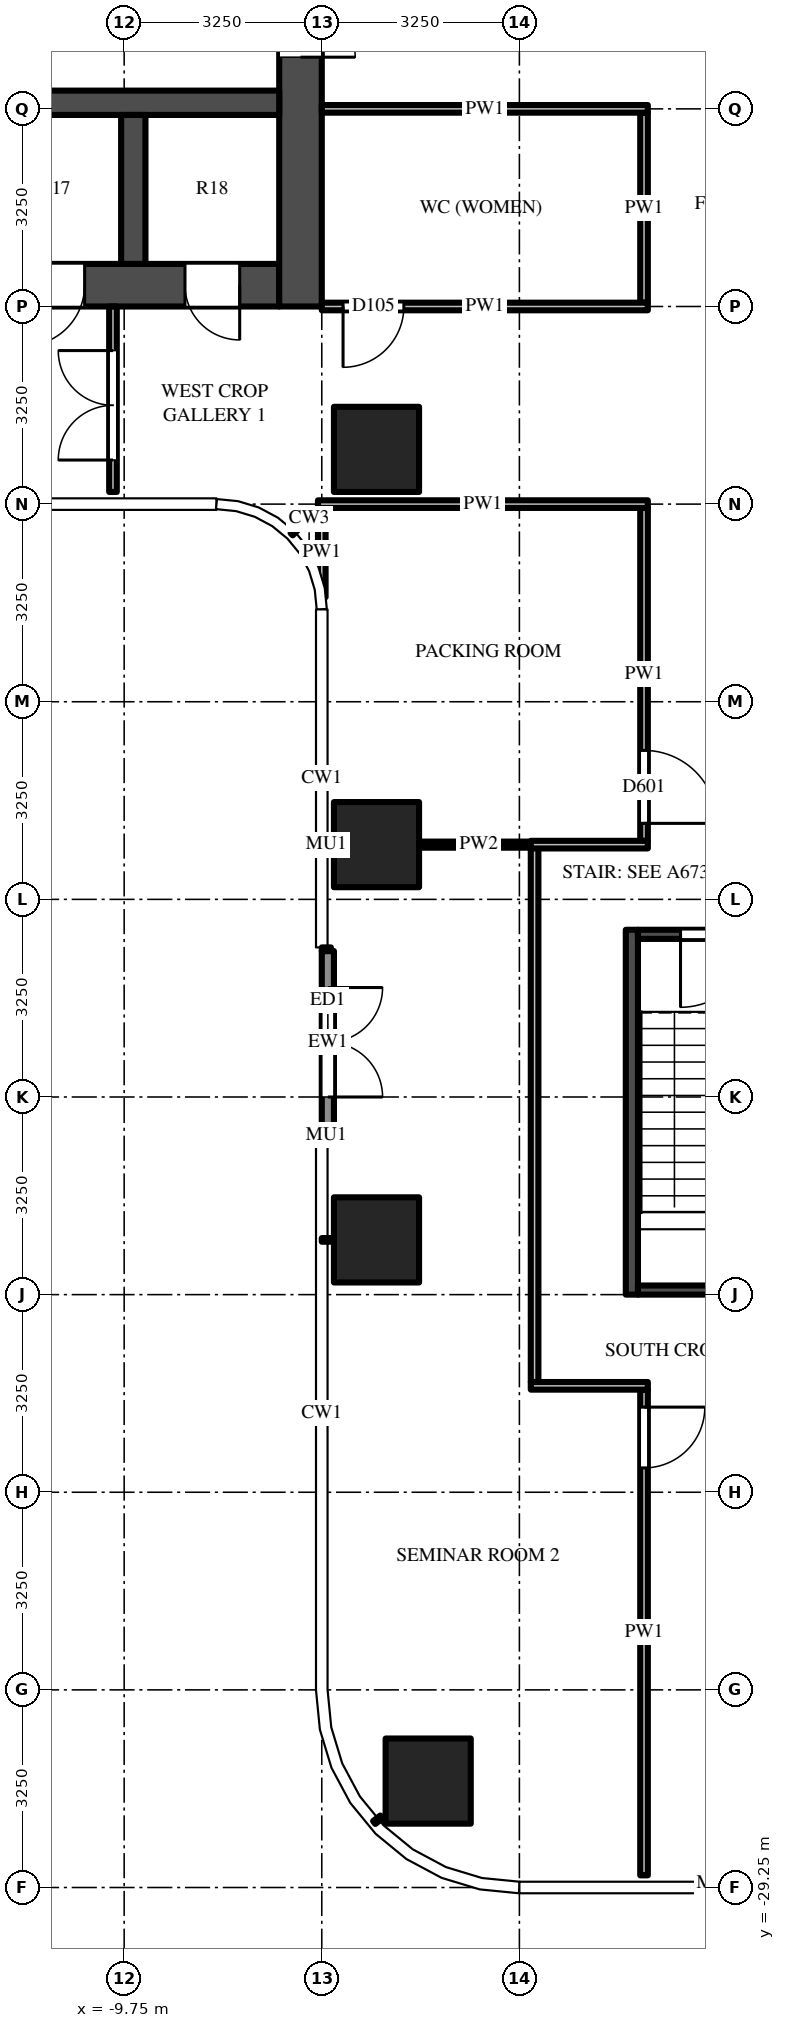
"""IFC4 building model, lengths in metres.
Left out: names, types, materials, properties, quantities, classifications, styles, units other than length and angle.
Written with IfcOpenShell. Run it as: python <this file> out.ifc"""

import sys

from ifc_helpers import new_model, si_unit, direction, frame, frame_2d, origin, origin_2d, place, context, subcontext, project, spatial, rectangle, extrude, source, transform, mapped, element, fill, save


model = new_model("IFC4")
c1 = context("Model", 3, precision=1e-05, world=origin(), true_north=direction((0.0, 1.0)))
c2 = subcontext(c1, "Body", "Model", "MODEL_VIEW")
j1 = project(units=[si_unit("LENGTHUNIT", "METRE"), si_unit("PLANEANGLEUNIT", "RADIAN")], contexts=[c1])
p1 = place(None, origin())
s1 = spatial("IfcSite", under=j1, at=p1, CompositionType="ELEMENT")
p2 = place(p1, origin())
s2 = spatial("IfcBuilding", under=s1, at=p2, CompositionType="ELEMENT")
p3 = place(p2, frame((0.0, 0.0, 65.5)))
s3 = spatial("IfcBuildingStorey", under=s2, at=p3, CompositionType="ELEMENT", Elevation=65.5)
m1 = source(origin(), c2, "Body", "SweptSolid", [
    extrude(rectangle(XDim=1.4, YDim=1.4, at=origin_2d()), origin(), (0.0, 0.0, 1.0), 4.5),
])
for number, where, z_axis, x_axis in (
    (1, (-5.6, -5.6, 0.0), (0.0, 0.0, 1.0), (1.0, 0.0, 0.0)),
    (2, (-5.6, -12.1, 0.0), (0.0, 0.0, 1.0), (1.0, 0.0, 0.0)),
    (3, (-5.6, -18.6, 0.0), (0.0, 0.0, 1.0), (1.0, 0.0, 0.0)),
    (4, (-4.75, -27.5, 0.0), (0.0, 0.0, 1.0), (1.0, 0.0, 0.0)),
):
    element("IfcColumn", number, at=place(p3, frame(where, z_axis=z_axis, x_axis=x_axis)), inside=s3, PredefinedType="COLUMN", context=c2, shape_type="MappedRepresentation", body=[
        mapped(m1, transform((0.0, 0.0, 0.0))),
    ])
m2 = source(origin(), c2, "Body", "SweptSolid", [
    extrude(rectangle(XDim=14.85, YDim=0.7, at=frame_2d((7.425, 0.0))), origin(), (0.0, 0.0, 1.0), 4.25),
])
p4 = place(p3, frame((-7.2, -2.9, 0.0), z_axis=(0.0, 0.0, 1.0), x_axis=(-1.0, 0.0, 0.0)))
e5 = element("IfcWall", 5, at=p4, inside=s3, PredefinedType="SHEAR", context=c2, shape_type="MappedRepresentation", body=[
    mapped(m2, transform((0.0, 0.0, 0.0))),
])
m3 = source(origin(), c2, "Body", "SweptSolid", [
    extrude(rectangle(XDim=1.3, YDim=2.1, at=frame_2d((0.65, 1.05))), frame((0.0, 0.36, 0.0), z_axis=(0.0, -1.0, 0.0), x_axis=(1.0, 0.0, 0.0)), (0.0, 0.0, 1.0), 0.72),
])
p5 = place(p4, frame((12.2, 0.0, 0.0)))
e6 = element("IfcOpeningElement", 6, at=p5, cuts=e5, PredefinedType="OPENING", context=c2, shape_type="MappedRepresentation", body=[
    mapped(m3, transform((0.0, 0.0, 0.0))),
])
m4 = source(origin(), c2, "Body", "SweptSolid", [
    extrude(rectangle(XDim=1.2, YDim=2.1, at=frame_2d((0.6, 1.05))), frame((0.0, 0.36, 0.0), z_axis=(0.0, -1.0, 0.0), x_axis=(1.0, 0.0, 0.0)), (0.0, 0.0, 1.0), 0.72),
])
p6 = place(p4, frame((9.85, 0.0, 0.0)))
e7 = element("IfcOpeningElement", 7, at=p6, cuts=e5, PredefinedType="OPENING", context=c2, shape_type="MappedRepresentation", body=[
    mapped(m4, transform((0.0, 0.0, 0.0))),
])
m5 = source(origin(), c2, "Body", "SweptSolid", [
    extrude(rectangle(XDim=1.0, YDim=2.1, at=frame_2d((0.5, 1.05))), frame((0.0, 0.36, 0.0), z_axis=(0.0, -1.0, 0.0), x_axis=(1.0, 0.0, 0.0)), (0.0, 0.0, 1.0), 0.72),
])
p7 = place(p4, frame((7.9, 0.0, 0.0)))
e8 = element("IfcOpeningElement", 8, at=p7, cuts=e5, PredefinedType="OPENING", context=c2, shape_type="MappedRepresentation", body=[
    mapped(m5, transform((0.0, 0.0, 0.0))),
])
m6 = source(origin(), c2, "Body", "SweptSolid", [
    extrude(rectangle(XDim=0.9, YDim=2.1, at=frame_2d((0.45, 1.05))), frame((0.0, 0.36, 0.0), z_axis=(0.0, -1.0, 0.0), x_axis=(1.0, 0.0, 0.0)), (0.0, 0.0, 1.0), 0.72),
])
p8 = place(p4, frame((0.65, 0.0, 0.0)))
e9 = element("IfcOpeningElement", 9, at=p8, cuts=e5, PredefinedType="OPENING", context=c2, shape_type="MappedRepresentation", body=[
    mapped(m6, transform((0.0, 0.0, 0.0))),
])
p9 = place(p4, frame((3.2, 0.0, 0.0)))
e10 = element("IfcOpeningElement", 10, at=p9, cuts=e5, PredefinedType="OPENING", context=c2, shape_type="MappedRepresentation", body=[
    mapped(m5, transform((0.0, 0.0, 0.0))),
])
p10 = place(p4, frame((5.85, 0.0, 0.0)))
e11 = element("IfcOpeningElement", 11, at=p10, cuts=e5, PredefinedType="OPENING", context=c2, shape_type="MappedRepresentation", body=[
    mapped(m6, transform((0.0, 0.0, 0.0))),
])
m7 = source(origin(), c2, "Body", "SweptSolid", [
    extrude(rectangle(XDim=9.05, YDim=0.7, at=frame_2d((4.525, 0.0))), origin(), (0.0, 0.0, 1.0), 4.25),
])
p11 = place(p3, frame((-6.85, 5.8, 0.0), z_axis=(0.0, 0.0, 1.0), x_axis=(0.0, -1.0, 0.0)))
e12 = element("IfcWall", 12, at=p11, inside=s3, PredefinedType="SHEAR", context=c2, shape_type="MappedRepresentation", body=[
    mapped(m7, transform((0.0, 0.0, 0.0))),
])
m8 = source(origin(), c2, "Body", "SweptSolid", [
    extrude(rectangle(XDim=1.8, YDim=2.1, at=frame_2d((0.9, 1.05))), frame((0.0, 0.36, 0.0), z_axis=(0.0, -1.0, 0.0), x_axis=(1.0, 0.0, 0.0)), (0.0, 0.0, 1.0), 0.72),
])
p12 = place(p11, frame((3.15, 0.0, 0.0)))
e13 = element("IfcOpeningElement", 13, at=p12, cuts=e12, PredefinedType="OPENING", context=c2, shape_type="MappedRepresentation", body=[
    mapped(m8, transform((0.0, 0.0, 0.0))),
])
m9 = source(origin(), c2, "Body", "SweptSolid", [
    extrude(rectangle(XDim=14.85, YDim=0.4, at=frame_2d((7.425, 0.0))), origin(), (0.0, 0.0, 1.0), 4.25),
])
p13 = place(p3, frame((-7.2, 0.1, 0.0), z_axis=(0.0, 0.0, 1.0), x_axis=(-1.0, 0.0, 0.0)))
e14 = element("IfcWall", 14, at=p13, inside=s3, PredefinedType="SHEAR", context=c2, shape_type="MappedRepresentation", body=[
    mapped(m9, transform((0.0, 0.0, 0.0))),
])
m10 = source(origin(), c2, "Body", "SweptSolid", [
    extrude(rectangle(XDim=1.0, YDim=2.1, at=frame_2d((0.5, 1.05))), frame((0.0, 0.21, 0.0), z_axis=(0.0, -1.0, 0.0), x_axis=(1.0, 0.0, 0.0)), (0.0, 0.0, 1.0), 0.42),
])
p14 = place(p13, frame((7.9, 0.0, 0.0)))
e15 = element("IfcOpeningElement", 15, at=p14, cuts=e14, PredefinedType="OPENING", context=c2, shape_type="MappedRepresentation", body=[
    mapped(m10, transform((0.0, 0.0, 0.0))),
])
m11 = source(origin(), c2, "Body", "SweptSolid", [
    extrude(rectangle(XDim=2.45, YDim=0.4, at=frame_2d((1.225, 0.0))), origin(), (0.0, 0.0, 1.0), 4.25),
])
p15 = place(p3, frame((-9.6, -0.1, 0.0), z_axis=(0.0, 0.0, 1.0), x_axis=(0.0, -1.0, 0.0)))
e16 = element("IfcWall", 16, at=p15, inside=s3, PredefinedType="SHEAR", context=c2, shape_type="MappedRepresentation", body=[
    mapped(m11, transform((0.0, 0.0, 0.0))),
])
m12 = source(origin(), c2, "Body", "SweptSolid", [
    extrude(rectangle(XDim=6.0, YDim=0.2, at=frame_2d((3.0, 0.0))), origin(), (0.0, 0.0, 1.0), 4.25),
])
p16 = place(p3, frame((-1.4, -13.5, 0.0), z_axis=(0.0, 0.0, 1.0), x_axis=(0.0, -1.0, 0.0)))
e17 = element("IfcWall", 17, at=p16, inside=s3, PredefinedType="SHEAR", context=c2, shape_type="MappedRepresentation", body=[
    mapped(m12, transform((0.0, 0.0, 0.0))),
])
m13 = source(origin(), c2, "Body", "SweptSolid", [
    extrude(rectangle(XDim=2.6, YDim=0.15, at=frame_2d((1.3, 0.0))), origin(), (0.0, 0.0, 1.0), 4.25),
])
p17 = place(p3, frame((1.3, -13.575, 0.0), z_axis=(0.0, 0.0, 1.0), x_axis=(-1.0, 0.0, 0.0)))
e18 = element("IfcWall", 18, at=p17, inside=s3, PredefinedType="SHEAR", context=c2, shape_type="MappedRepresentation", body=[
    mapped(m13, transform((0.0, 0.0, 0.0))),
])
m14 = source(origin(), c2, "Body", "SweptSolid", [
    extrude(rectangle(XDim=1.2, YDim=2.1, at=frame_2d((0.6, 1.05))), frame((0.0, 0.085, 0.0), z_axis=(0.0, -1.0, 0.0), x_axis=(1.0, 0.0, 0.0)), (0.0, 0.0, 1.0), 0.17),
])
p18 = place(p17, frame((0.7, 0.0, 0.0)))
e19 = element("IfcOpeningElement", 19, at=p18, cuts=e18, PredefinedType="OPENING", context=c2, shape_type="MappedRepresentation", body=[
    mapped(m14, transform((0.0, 0.0, 0.0))),
])
p19 = place(p3, frame((1.3, -19.425, 0.0), z_axis=(0.0, 0.0, 1.0), x_axis=(-1.0, 0.0, 0.0)))
e20 = element("IfcWall", 20, at=p19, inside=s3, PredefinedType="SHEAR", context=c2, shape_type="MappedRepresentation", body=[
    mapped(m13, transform((0.0, 0.0, 0.0))),
])
m15 = source(origin(), c2, "Body", "SweptSolid", [
    extrude(rectangle(XDim=3.0, YDim=0.2, at=frame_2d((1.5, 0.0))), origin(), (0.0, 0.0, 1.0), 4.25),
])
p20 = place(p3, frame((-6.4, -13.85, 0.0), z_axis=(0.0, 0.0, 1.0), x_axis=(0.0, -1.0, 0.0)))
e21 = element("IfcWall", 21, at=p20, inside=s3, PredefinedType="SOLIDWALL", context=c2, shape_type="MappedRepresentation", body=[
    mapped(m15, transform((0.0, 0.0, 0.0))),
])
m16 = source(origin(), c2, "Body", "SweptSolid", [
    extrude(rectangle(XDim=1.8, YDim=2.4, at=frame_2d((0.9, 1.2))), frame((0.0, 0.11, 0.0), z_axis=(0.0, -1.0, 0.0), x_axis=(1.0, 0.0, 0.0)), (0.0, 0.0, 1.0), 0.22),
])
p21 = place(p20, frame((0.6, 0.0, 0.0)))
e22 = element("IfcOpeningElement", 22, at=p21, cuts=e21, PredefinedType="OPENING", context=c2, shape_type="MappedRepresentation", body=[
    mapped(m16, transform((0.0, 0.0, 0.0))),
])
m17 = source(origin(), c2, "Body", "SweptSolid", [
    extrude(rectangle(XDim=3.05, YDim=0.125, at=frame_2d((1.525, 0.0))), origin(), (0.0, 0.0, 1.0), 3.33),
])
p22 = place(p3, frame((-9.934, -6.3, 0.0), z_axis=(0.0, 0.0, 1.0), x_axis=(0.0, 1.0, 0.0)))
e23 = element("IfcWall", 23, at=p22, inside=s3, PredefinedType="PARTITIONING", context=c2, shape_type="MappedRepresentation", body=[
    mapped(m17, transform((0.0, 0.0, 0.0))),
])
m18 = source(origin(), c2, "Body", "SweptSolid", [
    extrude(rectangle(XDim=1.8, YDim=2.1, at=frame_2d((0.9, 1.05))), frame((0.0, 0.073, 0.0), z_axis=(0.0, -1.0, 0.0), x_axis=(1.0, 0.0, 0.0)), (0.0, 0.0, 1.0), 0.145),
])
p23 = place(p22, frame((0.525, 0.0, 0.0)))
e24 = element("IfcOpeningElement", 24, at=p23, cuts=e23, PredefinedType="OPENING", context=c2, shape_type="MappedRepresentation", body=[
    mapped(m18, transform((0.0, 0.0, 0.0))),
])
m19 = source(origin(), c2, "Body", "SweptSolid", [
    extrude(rectangle(XDim=1.469, YDim=0.125, at=frame_2d((0.734, 0.0))), origin(), (0.0, 0.0, 1.0), 4.25),
])
p24 = place(p3, frame((-6.5, -6.562, 0.0), z_axis=(0.0, 0.0, 1.0), x_axis=(0.0, -1.0, 0.0)))
e25 = element("IfcWall", 25, at=p24, inside=s3, PredefinedType="PARTITIONING", context=c2, shape_type="MappedRepresentation", body=[
    mapped(m19, transform((0.0, 0.0, 0.0))),
])
m20 = source(origin(), c2, "Body", "SweptSolid", [
    extrude(rectangle(XDim=8.788, YDim=0.125, at=frame_2d((4.394, 0.0))), origin(), (0.0, 0.0, 1.0), 3.468),
])
p25 = place(p3, frame((-3.0, -20.938, 0.0), z_axis=(0.0, 0.0, 1.0), x_axis=(0.0, 1.0, 0.0)))
e26 = element("IfcWall", 26, at=p25, inside=s3, PredefinedType="PARTITIONING", context=c2, shape_type="MappedRepresentation", body=[
    mapped(m20, transform((0.0, 0.0, 0.0))),
])
m21 = source(origin(), c2, "Body", "SweptSolid", [
    extrude(rectangle(XDim=7.988, YDim=0.125, at=frame_2d((3.994, 0.0))), origin(), (0.0, 0.0, 1.0), 3.33),
])
p26 = place(p3, frame((-1.2, -21.062, 0.0), z_axis=(0.0, 0.0, 1.0), x_axis=(0.0, -1.0, 0.0)))
e27 = element("IfcWall", 27, at=p26, inside=s3, PredefinedType="PARTITIONING", context=c2, shape_type="MappedRepresentation", body=[
    mapped(m21, transform((0.0, 0.0, 0.0))),
])
m22 = source(origin(), c2, "Body", "SweptSolid", [
    extrude(rectangle(XDim=1.0, YDim=2.1, at=frame_2d((0.5, 1.05))), frame((0.0, 0.073, 0.0), z_axis=(0.0, -1.0, 0.0), x_axis=(1.0, 0.0, 0.0)), (0.0, 0.0, 1.0), 0.145),
])
p27 = place(p26, frame((0.288, 0.0, 0.0)))
e28 = element("IfcOpeningElement", 28, at=p27, cuts=e27, PredefinedType="OPENING", context=c2, shape_type="MappedRepresentation", body=[
    mapped(m22, transform((0.0, 0.0, 0.0))),
])
m23 = source(origin(), c2, "Body", "SweptSolid", [
    extrude(rectangle(XDim=5.475, YDim=0.125, at=frame_2d((2.738, 0.0))), origin(), (0.0, 0.0, 1.0), 3.468),
])
p28 = place(p3, frame((-1.2, -6.562, 0.0), z_axis=(0.0, 0.0, 1.0), x_axis=(0.0, -1.0, 0.0)))
e29 = element("IfcWall", 29, at=p28, inside=s3, PredefinedType="PARTITIONING", context=c2, shape_type="MappedRepresentation", body=[
    mapped(m23, transform((0.0, 0.0, 0.0))),
])
m24 = source(origin(), c2, "Body", "SweptSolid", [
    extrude(rectangle(XDim=1.2, YDim=2.1, at=frame_2d((0.6, 1.05))), frame((0.0, 0.073, 0.0), z_axis=(0.0, -1.0, 0.0), x_axis=(1.0, 0.0, 0.0)), (0.0, 0.0, 1.0), 0.145),
])
p29 = place(p28, frame((3.988, 0.0, 0.0)))
e30 = element("IfcOpeningElement", 30, at=p29, cuts=e29, PredefinedType="OPENING", context=c2, shape_type="MappedRepresentation", body=[
    mapped(m24, transform((0.0, 0.0, 0.0))),
])
m25 = source(origin(), c2, "Body", "SweptSolid", [
    extrude(rectangle(XDim=3.125, YDim=0.125, at=frame_2d((1.562, 0.0))), origin(), (0.0, 0.0, 1.0), 3.546),
])
p30 = place(p3, frame((-1.2, -0.062, 0.0), z_axis=(0.0, 0.0, 1.0), x_axis=(0.0, -1.0, 0.0)))
e31 = element("IfcWall", 31, at=p30, inside=s3, PredefinedType="PARTITIONING", context=c2, shape_type="MappedRepresentation", body=[
    mapped(m25, transform((0.0, 0.0, 0.0))),
])
m26 = source(origin(), c2, "Body", "SweptSolid", [
    extrude(rectangle(XDim=1.925, YDim=0.125, at=frame_2d((0.962, 0.0))), origin(), (0.0, 0.0, 1.0), 4.25),
])
p31 = place(p3, frame((-1.137, -21.0, 0.0), z_axis=(0.0, 0.0, 1.0), x_axis=(-1.0, 0.0, 0.0)))
e32 = element("IfcWall", 32, at=p31, inside=s3, PredefinedType="PARTITIONING", context=c2, shape_type="MappedRepresentation", body=[
    mapped(m26, transform((0.0, 0.0, 0.0))),
])
m27 = source(origin(), c2, "Body", "SweptSolid", [
    extrude(rectangle(XDim=1.962, YDim=0.1, at=frame_2d((0.981, 0.0))), origin(), (0.0, 0.0, 1.0), 3.468),
])
p32 = place(p3, frame((-4.9, -12.1, 0.0), z_axis=(0.0, 0.0, 1.0), x_axis=(1.0, 0.0, 0.0)))
e33 = element("IfcWall", 33, at=p32, inside=s3, PredefinedType="PARTITIONING", context=c2, shape_type="MappedRepresentation", body=[
    mapped(m27, transform((0.0, 0.0, 0.0))),
])
m28 = source(origin(), c2, "Body", "SweptSolid", [
    extrude(rectangle(XDim=1.925, YDim=0.125, at=frame_2d((0.962, 0.0))), origin(), (0.0, 0.0, 1.0), 3.468),
])
p33 = place(p3, frame((-3.062, -12.1, 0.0), z_axis=(0.0, 0.0, 1.0), x_axis=(1.0, 0.0, 0.0)))
e34 = element("IfcWall", 34, at=p33, inside=s3, PredefinedType="PARTITIONING", context=c2, shape_type="MappedRepresentation", body=[
    mapped(m28, transform((0.0, 0.0, 0.0))),
])
m29 = source(origin(), c2, "Body", "SweptSolid", [
    extrude(rectangle(XDim=5.425, YDim=0.125, at=frame_2d((2.712, 0.0))), origin(), (0.0, 0.0, 1.0), 3.33),
])
p34 = place(p3, frame((-1.137, -6.5, 0.0), z_axis=(0.0, 0.0, 1.0), x_axis=(-1.0, 0.0, 0.0)))
e35 = element("IfcWall", 35, at=p34, inside=s3, PredefinedType="PARTITIONING", context=c2, shape_type="MappedRepresentation", body=[
    mapped(m29, transform((0.0, 0.0, 0.0))),
])
m30 = source(origin(), c2, "Body", "SweptSolid", [
    extrude(rectangle(XDim=5.363, YDim=0.125, at=frame_2d((2.681, 0.0))), origin(), (0.0, 0.0, 1.0), 3.468),
])
p35 = place(p3, frame((-1.137, -3.25, 0.0), z_axis=(0.0, 0.0, 1.0), x_axis=(-1.0, 0.0, 0.0)))
e36 = element("IfcWall", 36, at=p35, inside=s3, PredefinedType="PARTITIONING", context=c2, shape_type="MappedRepresentation", body=[
    mapped(m30, transform((0.0, 0.0, 0.0))),
])
p36 = place(p35, frame((4.012, 0.0, 0.0)))
e37 = element("IfcOpeningElement", 37, at=p36, cuts=e36, PredefinedType="OPENING", context=c2, shape_type="MappedRepresentation", body=[
    mapped(m22, transform((0.0, 0.0, 0.0))),
])
p37 = place(p3, frame((-1.137, 0.0, 0.0), z_axis=(0.0, 0.0, 1.0), x_axis=(-1.0, 0.0, 0.0)))
e38 = element("IfcWall", 38, at=p37, inside=s3, PredefinedType="PARTITIONING", context=c2, shape_type="MappedRepresentation", body=[
    mapped(m30, transform((0.0, 0.0, 0.0))),
])
m31 = source(origin(), c2, "Body", "SweptSolid", [
    extrude(rectangle(XDim=1.8, YDim=2.1, at=frame_2d((0.9, 1.05))), frame((0.0, -0.275, 0.0), z_axis=(0.0, -1.0, 0.0), x_axis=(1.0, 0.0, 0.0)), (0.0, 0.0, 1.0), 0.05),
])
p38 = place(p12, origin())
e39 = element("IfcDoor", 39, at=p38, inside=s3, OperationType="DOUBLE_DOOR_SINGLE_SWING", PredefinedType="DOOR", context=c2, shape_type="MappedRepresentation", body=[
    mapped(m31, transform((0.0, 0.0, 0.0))),
])
fill(e13, e39)
m32 = source(origin(), c2, "Body", "SweptSolid", [
    extrude(rectangle(XDim=0.9, YDim=2.1, at=frame_2d((0.45, 1.05))), frame((0.0, -0.275, 0.0), z_axis=(0.0, -1.0, 0.0), x_axis=(1.0, 0.0, 0.0)), (0.0, 0.0, 1.0), 0.05),
])
p39 = place(p8, origin())
e40 = element("IfcDoor", 40, at=p39, inside=s3, OperationType="SINGLE_SWING_LEFT", PredefinedType="DOOR", context=c2, shape_type="MappedRepresentation", body=[
    mapped(m32, transform((0.0, 0.0, 0.0))),
])
fill(e9, e40)
m33 = source(origin(), c2, "Body", "SweptSolid", [
    extrude(rectangle(XDim=1.0, YDim=2.1, at=frame_2d((0.5, 1.05))), frame((0.0, -0.275, 0.0), z_axis=(0.0, -1.0, 0.0), x_axis=(1.0, 0.0, 0.0)), (0.0, 0.0, 1.0), 0.05),
])
p40 = place(p9, origin())
e41 = element("IfcDoor", 41, at=p40, inside=s3, OperationType="SINGLE_SWING_RIGHT", PredefinedType="DOOR", context=c2, shape_type="MappedRepresentation", body=[
    mapped(m33, transform((0.0, 0.0, 0.0))),
])
fill(e10, e41)
m34 = source(origin(), c2, "Body", "SweptSolid", [
    extrude(rectangle(XDim=1.2, YDim=2.1, at=frame_2d((0.6, 1.05))), frame((0.0, 0.025, 0.0), z_axis=(0.0, -1.0, 0.0), x_axis=(1.0, 0.0, 0.0)), (0.0, 0.0, 1.0), 0.05),
])
p41 = place(p18, origin())
e42 = element("IfcDoor", 42, at=p41, inside=s3, OperationType="SINGLE_SWING_RIGHT", PredefinedType="DOOR", context=c2, shape_type="MappedRepresentation", body=[
    mapped(m34, transform((0.0, 0.0, 0.0))),
])
fill(e19, e42)
m35 = source(origin(), c2, "Body", "SweptSolid", [
    extrude(rectangle(XDim=1.8, YDim=2.4, at=frame_2d((0.9, 1.2))), frame((0.0, 0.025, 0.0), z_axis=(0.0, -1.0, 0.0), x_axis=(1.0, 0.0, 0.0)), (0.0, 0.0, 1.0), 0.05),
])
p42 = place(p21, origin())
e43 = element("IfcDoor", 43, at=p42, inside=s3, OperationType="DOUBLE_DOOR_SINGLE_SWING", PredefinedType="DOOR", context=c2, shape_type="MappedRepresentation", body=[
    mapped(m35, transform((0.0, 0.0, 0.0))),
])
fill(e22, e43)
m36 = source(origin(), c2, "Body", "SweptSolid", [
    extrude(rectangle(XDim=1.0, YDim=2.1, at=frame_2d((0.5, 1.05))), frame((0.0, 0.025, 0.0), z_axis=(0.0, -1.0, 0.0), x_axis=(1.0, 0.0, 0.0)), (0.0, 0.0, 1.0), 0.05),
])
p43 = place(p27, origin())
e44 = element("IfcDoor", 44, at=p43, inside=s3, OperationType="SINGLE_SWING_LEFT", PredefinedType="DOOR", context=c2, shape_type="MappedRepresentation", body=[
    mapped(m36, transform((0.0, 0.0, 0.0))),
])
fill(e28, e44)
p44 = place(p29, origin())
e45 = element("IfcDoor", 45, at=p44, inside=s3, OperationType="SINGLE_SWING_RIGHT", PredefinedType="DOOR", context=c2, shape_type="MappedRepresentation", body=[
    mapped(m34, transform((0.0, 0.0, 0.0))),
])
fill(e30, e45)
m37 = source(origin(), c2, "Body", "SweptSolid", [
    extrude(rectangle(XDim=1.8, YDim=2.1, at=frame_2d((0.9, 1.05))), frame((0.0, 0.025, 0.0), z_axis=(0.0, -1.0, 0.0), x_axis=(1.0, 0.0, 0.0)), (0.0, 0.0, 1.0), 0.05),
])
p45 = place(p23, origin())
e46 = element("IfcDoor", 46, at=p45, inside=s3, OperationType="DOUBLE_DOOR_SINGLE_SWING", PredefinedType="DOOR", context=c2, shape_type="MappedRepresentation", body=[
    mapped(m37, transform((0.0, 0.0, 0.0))),
])
fill(e24, e46)
p46 = place(p36, origin())
e47 = element("IfcDoor", 47, at=p46, inside=s3, OperationType="SINGLE_SWING_RIGHT", PredefinedType="DOOR", context=c2, shape_type="MappedRepresentation", body=[
    mapped(m36, transform((0.0, 0.0, 0.0))),
])
fill(e37, e47)
save(model, sys.argv[1])
